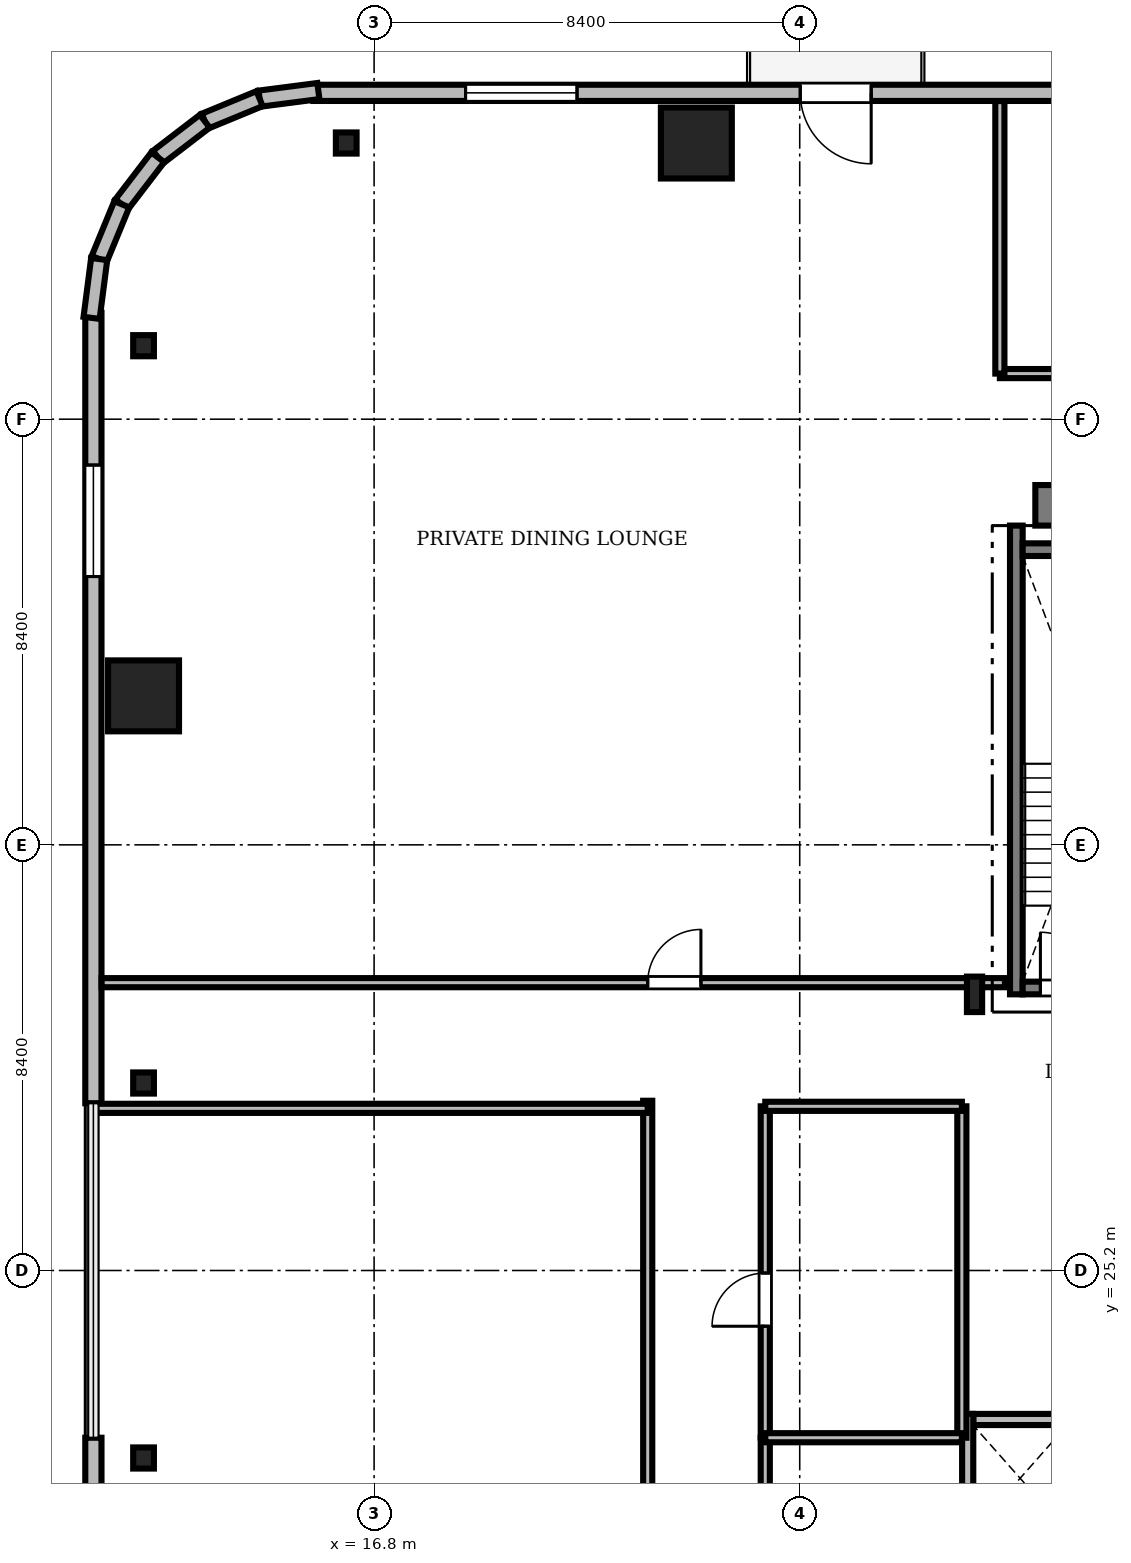
"""IFC4 building model, lengths in metres.
Left out: names, types, materials, properties, quantities, classifications, styles, units other than length and angle.
Written with IfcOpenShell. Run it as: python <this file> out.ifc"""

import sys

from ifc_helpers import new_model, si_unit, direction, frame, frame_2d, origin, origin_2d, place, context, subcontext, project, spatial, rectangle, i_section, extrude, source, transform, mapped, element, fill, save


model = new_model("IFC4")
c1 = context("Model", 3, precision=1e-05, world=origin(), true_north=direction((0.0, 1.0)))
c2 = subcontext(c1, "Body", "Model", "MODEL_VIEW")
j1 = project(units=[si_unit("LENGTHUNIT", "METRE"), si_unit("PLANEANGLEUNIT", "RADIAN")], contexts=[c1])
p1 = place(None, origin())
s1 = spatial("IfcSite", under=j1, at=p1, CompositionType="ELEMENT")
p2 = place(p1, origin())
s2 = spatial("IfcBuilding", under=s1, at=p2, CompositionType="ELEMENT")
p3 = place(p2, frame((0.0, 0.0, 192.3)))
s3 = spatial("IfcBuildingStorey", under=s2, at=p3, CompositionType="ELEMENT", Elevation=192.3)
m1 = source(origin(), c2, "Body", "SweptSolid", [
    extrude(rectangle(XDim=17.52, YDim=0.8, at=frame_2d((8.76, 0.0))), origin(), (0.0, 0.0, 1.0), 3.53),
])
p4 = place(p3, frame((29.85, 40.3, 0.0), z_axis=(0.0, 0.0, 1.0), x_axis=(1.0, 0.0, 0.0)))
e1 = element("IfcWall", 1, at=p4, inside=s3, PredefinedType="SHEAR", context=c2, shape_type="MappedRepresentation", body=[
    mapped(m1, transform((0.0, 0.0, 0.0), scale=1.0)),
])
m2 = source(origin(), c2, "Body", "SweptSolid", [
    extrude(i_section(OverallWidth=0.3, OverallDepth=0.7, WebThickness=0.017, FlangeThickness=0.032, FilletRadius=0.027, at=origin_2d()), origin(), (0.0, 0.0, 1.0), 3.53),
])
p5 = place(p3, frame((28.65, 30.65, 0.0), z_axis=(0.0, 0.0, 1.0), x_axis=(1.0, 0.0, 0.0)))
e2 = element("IfcColumn", 2, at=p5, inside=s3, PredefinedType="COLUMN", context=c2, shape_type="MappedRepresentation", body=[
    mapped(m2, transform((0.0, 0.0, 0.0), scale=1.0)),
])
m3 = source(origin(), c2, "Body", "SweptSolid", [
    extrude(rectangle(XDim=1.4, YDim=1.4, at=origin_2d()), origin(), (0.0, 0.0, 1.0), 3.53),
])
for number, where, z_axis, x_axis in (
    (3, (23.16, 47.45, 0.0), (0.0, 0.0, 1.0), (1.0, 0.0, 0.0)),
    (4, (12.25, 36.54, 0.0), (0.0, 0.0, 1.0), (1.0, 0.0, 0.0)),
):
    element("IfcColumn", number, at=place(p3, frame(where, z_axis=z_axis, x_axis=x_axis)), inside=s3, PredefinedType="COLUMN", context=c2, shape_type="MappedRepresentation", body=[
        mapped(m3, transform((0.0, 0.0, 0.0), scale=1.0)),
    ])
m4 = source(origin(), c2, "Body", "SweptSolid", [
    extrude(i_section(OverallWidth=0.409, OverallDepth=0.417, WebThickness=0.021, FlangeThickness=0.033, FilletRadius=0.015, at=origin_2d()), origin(), (0.0, 0.0, 1.0), 3.53),
])
for number, where, z_axis, x_axis in (
    (5, (16.25, 47.45, 0.0), (0.0, 0.0, 1.0), (1.0, 0.0, 0.0)),
    (6, (12.25, 43.45, 0.0), (0.0, 0.0, 1.0), (1.0, 0.0, 0.0)),
    (7, (12.25, 28.9, 0.0), (0.0, 0.0, 1.0), (1.0, 0.0, 0.0)),
    (8, (12.25, 21.5, 0.0), (0.0, 0.0, 1.0), (1.0, 0.0, 0.0)),
):
    element("IfcColumn", number, at=place(p3, frame(where, z_axis=z_axis, x_axis=x_axis)), inside=s3, PredefinedType="COLUMN", context=c2, shape_type="MappedRepresentation", body=[
        mapped(m4, transform((0.0, 0.0, 0.0), scale=1.0)),
    ])
m5 = source(origin(), c2, "Body", "SweptSolid", [
    extrude(rectangle(XDim=15.6, YDim=0.32, at=frame_2d((7.8, 0.0))), origin(), (0.0, 0.0, 1.0), 3.53),
])
p6 = place(p3, frame((31.2, 48.44, 0.0), z_axis=(0.0, 0.0, 1.0), x_axis=(-1.0, 0.0, 0.0)))
e9 = element("IfcWall", 9, at=p6, inside=s3, PredefinedType="SOLIDWALL", context=c2, shape_type="MappedRepresentation", body=[
    mapped(m5, transform((0.0, 0.0, 0.0), scale=1.0)),
])
m6 = source(origin(), c2, "Body", "SweptSolid", [
    extrude(rectangle(XDim=1.4, YDim=2.3, at=frame_2d((0.7, 1.15))), frame((0.0, 0.17, 0.0), z_axis=(0.0, -1.0, 0.0), x_axis=(1.0, 0.0, 0.0)), (0.0, 0.0, 1.0), 0.34),
])
p7 = place(p6, frame((4.59, 0.0, 0.0)))
e10 = element("IfcOpeningElement", 10, at=p7, cuts=e9, PredefinedType="OPENING", context=c2, shape_type="MappedRepresentation", body=[
    mapped(m6, transform((0.0, 0.0, 0.0), scale=1.0)),
])
m7 = source(origin(), c2, "Body", "SweptSolid", [
    extrude(rectangle(XDim=2.2, YDim=2.4, at=frame_2d((1.1, 1.2))), frame((0.0, 0.17, 0.0), z_axis=(0.0, -1.0, 0.0), x_axis=(1.0, 0.0, 0.0)), (0.0, 0.0, 1.0), 0.34),
])
p8 = place(p6, frame((10.395, 0.0, 0.72)))
e11 = element("IfcOpeningElement", 11, at=p8, cuts=e9, PredefinedType="OPENING", context=c2, shape_type="MappedRepresentation", body=[
    mapped(m7, transform((0.0, 0.0, 0.0), scale=1.0)),
])
m8 = source(origin(), c2, "Body", "SweptSolid", [
    extrude(rectangle(XDim=15.6, YDim=0.32, at=frame_2d((7.8, 0.0))), origin(), (0.0, 0.0, 1.0), 3.53),
])
p9 = place(p3, frame((11.26, 44.1, 0.0), z_axis=(0.0, 0.0, 1.0), x_axis=(0.0, -1.0, 0.0)))
e12 = element("IfcWall", 12, at=p9, inside=s3, PredefinedType="SOLIDWALL", context=c2, shape_type="MappedRepresentation", body=[
    mapped(m8, transform((0.0, 0.0, 0.0), scale=1.0)),
])
p10 = place(p9, frame((3.005, 0.0, 0.72)))
e13 = element("IfcOpeningElement", 13, at=p10, cuts=e12, PredefinedType="OPENING", context=c2, shape_type="MappedRepresentation", body=[
    mapped(m7, transform((0.0, 0.0, 0.0), scale=1.0)),
])
p11 = place(p3, frame((11.26, 21.9, 0.0), z_axis=(0.0, 0.0, 1.0), x_axis=(0.0, -1.0, 0.0)))
e14 = element("IfcWall", 14, at=p11, inside=s3, PredefinedType="SOLIDWALL", context=c2, shape_type="MappedRepresentation", body=[
    mapped(m5, transform((0.0, 0.0, 0.0), scale=1.0)),
])
p12 = place(p11, frame((4.59, 0.0, 0.0)))
e15 = element("IfcOpeningElement", 15, at=p12, cuts=e14, PredefinedType="OPENING", context=c2, shape_type="MappedRepresentation", body=[
    mapped(m6, transform((0.0, 0.0, 0.0), scale=1.0)),
])
p13 = place(p11, frame((10.395, 0.0, 0.72)))
e16 = element("IfcOpeningElement", 16, at=p13, cuts=e14, PredefinedType="OPENING", context=c2, shape_type="MappedRepresentation", body=[
    mapped(m7, transform((0.0, 0.0, 0.0), scale=1.0)),
])
m9 = source(origin(), c2, "Body", "SweptSolid", [
    extrude(rectangle(XDim=1.17, YDim=0.32, at=frame_2d((0.585, 0.0))), origin(), (0.0, 0.0, 1.0), 3.53),
])
p14 = place(p3, frame((15.7, 48.476, 0.0), z_axis=(0.0, 0.0, 1.0), x_axis=(-0.991735963317, -0.128295670475, 0.0)))
e17 = element("IfcWall", 17, at=p14, inside=s3, PredefinedType="SOLIDWALL", context=c2, shape_type="MappedRepresentation", body=[
    mapped(m9, transform((0.0, 0.0, 0.0), scale=1.0)),
])
m10 = source(origin(), c2, "Body", "SweptSolid", [
    extrude(rectangle(XDim=1.169, YDim=0.32, at=frame_2d((0.584, 0.0))), origin(), (0.0, 0.0, 1.0), 3.53),
])
p15 = place(p3, frame((14.54, 48.325, 0.0), z_axis=(0.0, 0.0, 1.0), x_axis=(-0.924552646638, -0.381054331552, 0.0)))
e18 = element("IfcWall", 18, at=p15, inside=s3, PredefinedType="SOLIDWALL", context=c2, shape_type="MappedRepresentation", body=[
    mapped(m10, transform((0.0, 0.0, 0.0), scale=1.0)),
])
m11 = source(origin(), c2, "Body", "SweptSolid", [
    extrude(rectangle(XDim=1.169, YDim=0.32, at=frame_2d((0.584, 0.0))), origin(), (0.0, 0.0, 1.0), 3.53),
])
p16 = place(p3, frame((13.459, 47.88, 0.0), z_axis=(0.0, 0.0, 1.0), x_axis=(-0.793663520347, -0.608356981114, 0.0)))
e19 = element("IfcWall", 19, at=p16, inside=s3, PredefinedType="SOLIDWALL", context=c2, shape_type="MappedRepresentation", body=[
    mapped(m11, transform((0.0, 0.0, 0.0), scale=1.0)),
])
m12 = source(origin(), c2, "Body", "SweptSolid", [
    extrude(rectangle(XDim=1.169, YDim=0.32, at=frame_2d((0.584, 0.0))), origin(), (0.0, 0.0, 1.0), 3.53),
])
p17 = place(p3, frame((12.531, 47.169, 0.0), z_axis=(0.0, 0.0, 1.0), x_axis=(-0.608387696831, -0.793639975269, 0.0)))
e20 = element("IfcWall", 20, at=p17, inside=s3, PredefinedType="SOLIDWALL", context=c2, shape_type="MappedRepresentation", body=[
    mapped(m12, transform((0.0, 0.0, 0.0), scale=1.0)),
])
p18 = place(p3, frame((11.82, 46.241, 0.0), z_axis=(0.0, 0.0, 1.0), x_axis=(-0.381054331552, -0.924552646638, 0.0)))
e21 = element("IfcWall", 21, at=p18, inside=s3, PredefinedType="SOLIDWALL", context=c2, shape_type="MappedRepresentation", body=[
    mapped(m10, transform((0.0, 0.0, 0.0), scale=1.0)),
])
p19 = place(p3, frame((11.375, 45.16, 0.0), z_axis=(0.0, 0.0, 1.0), x_axis=(-0.128295670475, -0.991735963317, 0.0)))
e22 = element("IfcWall", 22, at=p19, inside=s3, PredefinedType="SOLIDWALL", context=c2, shape_type="MappedRepresentation", body=[
    mapped(m9, transform((0.0, 0.0, 0.0), scale=1.0)),
])
m13 = source(origin(), c2, "Body", "SweptSolid", [
    extrude(rectangle(XDim=9.25, YDim=0.25, at=frame_2d((4.625, 0.0))), origin(), (0.0, 0.0, 1.0), 3.55),
])
p20 = place(p3, frame((29.475, 30.65, 0.0), z_axis=(0.0, 0.0, 1.0), x_axis=(0.0, 1.0, 0.0)))
e23 = element("IfcWall", 23, at=p20, inside=s3, PredefinedType="SOLIDWALL", context=c2, shape_type="MappedRepresentation", body=[
    mapped(m13, transform((0.0, 0.0, 0.0), scale=1.0)),
])
m14 = source(origin(), c2, "Body", "SweptSolid", [
    extrude(rectangle(XDim=3.15, YDim=0.25, at=frame_2d((1.575, 0.0))), origin(), (0.0, 0.0, 1.0), 3.55),
])
p21 = place(p3, frame((29.6, 39.425, 0.0), z_axis=(0.0, 0.0, 1.0), x_axis=(1.0, 0.0, 0.0)))
e24 = element("IfcWall", 24, at=p21, inside=s3, PredefinedType="SOLIDWALL", context=c2, shape_type="MappedRepresentation", body=[
    mapped(m14, transform((0.0, 0.0, 0.0), scale=1.0)),
])
p22 = place(p3, frame((29.6, 30.775, 0.0), z_axis=(0.0, 0.0, 1.0), x_axis=(1.0, 0.0, 0.0)))
e25 = element("IfcWall", 25, at=p22, inside=s3, PredefinedType="SOLIDWALL", context=c2, shape_type="MappedRepresentation", body=[
    mapped(m14, transform((0.0, 0.0, 0.0), scale=1.0)),
])
m15 = source(origin(), c2, "Body", "SweptSolid", [
    extrude(rectangle(XDim=1.1, YDim=2.2, at=frame_2d((0.55, 1.1))), frame((0.0, 0.135, 0.0), z_axis=(0.0, -1.0, 0.0), x_axis=(1.0, 0.0, 0.0)), (0.0, 0.0, 1.0), 0.27),
])
p23 = place(p22, frame((0.35, 0.0, 0.0)))
e26 = element("IfcOpeningElement", 26, at=p23, cuts=e25, PredefinedType="OPENING", context=c2, shape_type="MappedRepresentation", body=[
    mapped(m15, transform((0.0, 0.0, 0.0), scale=1.0)),
])
m16 = source(origin(), c2, "Body", "SweptSolid", [
    extrude(rectangle(XDim=1.85, YDim=0.22, at=frame_2d((0.925, 0.0))), origin(), (0.0, 0.0, 1.0), 3.53),
])
p24 = place(p3, frame((28.625, 22.26, 0.0), z_axis=(0.0, 0.0, 1.0), x_axis=(1.0, 0.0, 0.0)))
e27 = element("IfcWall", 27, at=p24, inside=s3, PredefinedType="SOLIDWALL", context=c2, shape_type="MappedRepresentation", body=[
    mapped(m16, transform((0.0, 0.0, 0.0), scale=1.0)),
])
m17 = source(origin(), c2, "Body", "SweptSolid", [
    extrude(rectangle(XDim=2.54, YDim=0.22, at=frame_2d((1.27, 0.0))), origin(), (0.0, 0.0, 1.0), 3.53),
])
p25 = place(p3, frame((28.515, 19.83, 0.0), z_axis=(0.0, 0.0, 1.0), x_axis=(0.0, 1.0, 0.0)))
e28 = element("IfcWall", 28, at=p25, inside=s3, PredefinedType="SOLIDWALL", context=c2, shape_type="MappedRepresentation", body=[
    mapped(m17, transform((0.0, 0.0, 0.0), scale=1.0)),
])
m18 = source(origin(), c2, "Body", "SweptSolid", [
    extrude(rectangle(XDim=28.428, YDim=0.18, at=frame_2d((14.214, 0.0))), origin(), (0.0, 0.0, 1.0), 2.772),
])
p26 = place(p3, frame((29.15, 42.9, 0.0), z_axis=(0.0, 0.0, 1.0), x_axis=(1.0, 0.0, 0.0)))
e29 = element("IfcWall", 29, at=p26, inside=s3, PredefinedType="PARTITIONING", context=c2, shape_type="MappedRepresentation", body=[
    mapped(m18, transform((0.0, 0.0, 0.0), scale=1.0)),
])
m19 = source(origin(), c2, "Body", "SweptSolid", [
    extrude(rectangle(XDim=1.05, YDim=2.2, at=frame_2d((0.525, 1.1))), frame((0.0, 0.1, 0.0), z_axis=(0.0, -1.0, 0.0), x_axis=(1.0, 0.0, 0.0)), (0.0, 0.0, 1.0), 0.2),
])
p27 = place(p26, frame((4.5, 0.0, 0.0)))
e30 = element("IfcOpeningElement", 30, at=p27, cuts=e29, PredefinedType="OPENING", context=c2, shape_type="MappedRepresentation", body=[
    mapped(m19, transform((0.0, 0.0, 0.0), scale=1.0)),
])
m20 = source(origin(), c2, "Body", "SweptSolid", [
    extrude(rectangle(XDim=17.828, YDim=0.18, at=frame_2d((8.914, 0.0))), origin(), (0.0, 0.0, 1.0), 2.772),
])
p28 = place(p3, frame((11.422, 30.88, 0.0), z_axis=(0.0, 0.0, 1.0), x_axis=(1.0, 0.0, 0.0)))
e31 = element("IfcWall", 31, at=p28, inside=s3, PredefinedType="PARTITIONING", context=c2, shape_type="MappedRepresentation", body=[
    mapped(m20, transform((0.0, 0.0, 0.0), scale=1.0)),
])
p29 = place(p28, frame((10.778, 0.0, 0.0)))
e32 = element("IfcOpeningElement", 32, at=p29, cuts=e31, PredefinedType="OPENING", context=c2, shape_type="MappedRepresentation", body=[
    mapped(m19, transform((0.0, 0.0, 0.0), scale=1.0)),
])
m21 = source(origin(), c2, "Body", "SweptSolid", [
    extrude(rectangle(XDim=14.98, YDim=0.18, at=frame_2d((7.49, 0.0))), origin(), (0.0, 0.0, 1.0), 2.972),
])
p30 = place(p3, frame((22.2, 13.57, 0.0), z_axis=(0.0, 0.0, 1.0), x_axis=(0.0, 1.0, 0.0)))
e33 = element("IfcWall", 33, at=p30, inside=s3, PredefinedType="PARTITIONING", context=c2, shape_type="MappedRepresentation", body=[
    mapped(m21, transform((0.0, 0.0, 0.0), scale=1.0)),
])
p31 = place(p30, frame((1.6, 0.0, 0.0)))
e34 = element("IfcOpeningElement", 34, at=p31, cuts=e33, PredefinedType="OPENING", context=c2, shape_type="MappedRepresentation", body=[
    mapped(m19, transform((0.0, 0.0, 0.0), scale=1.0)),
])
m22 = source(origin(), c2, "Body", "SweptSolid", [
    extrude(rectangle(XDim=6.54, YDim=0.18, at=frame_2d((3.27, 0.0))), origin(), (0.0, 0.0, 1.0), 2.972),
])
p32 = place(p3, frame((24.52, 21.9, 0.0), z_axis=(0.0, 0.0, 1.0), x_axis=(0.0, 1.0, 0.0)))
e35 = element("IfcWall", 35, at=p32, inside=s3, PredefinedType="PARTITIONING", context=c2, shape_type="MappedRepresentation", body=[
    mapped(m22, transform((0.0, 0.0, 0.0), scale=1.0)),
])
p33 = place(p32, frame((2.2, 0.0, 0.0)))
e36 = element("IfcOpeningElement", 36, at=p33, cuts=e35, PredefinedType="OPENING", context=c2, shape_type="MappedRepresentation", body=[
    mapped(m19, transform((0.0, 0.0, 0.0), scale=1.0)),
])
m23 = source(origin(), c2, "Body", "SweptSolid", [
    extrude(rectangle(XDim=5.4, YDim=0.18, at=frame_2d((2.7, 0.0))), origin(), (0.0, 0.0, 1.0), 2.972),
])
p34 = place(p3, frame((24.52, 16.5, 0.0), z_axis=(0.0, 0.0, 1.0), x_axis=(0.0, 1.0, 0.0)))
e37 = element("IfcWall", 37, at=p34, inside=s3, PredefinedType="PARTITIONING", context=c2, shape_type="MappedRepresentation", body=[
    mapped(m23, transform((0.0, 0.0, 0.0), scale=1.0)),
])
p35 = place(p34, frame((2.0, 0.0, 0.0)))
e38 = element("IfcOpeningElement", 38, at=p35, cuts=e37, PredefinedType="OPENING", context=c2, shape_type="MappedRepresentation", body=[
    mapped(m19, transform((0.0, 0.0, 0.0), scale=1.0)),
])
m24 = source(origin(), c2, "Body", "SweptSolid", [
    extrude(rectangle(XDim=10.97, YDim=0.18, at=frame_2d((5.485, 0.0))), origin(), (0.0, 0.0, 1.0), 2.772),
])
p36 = place(p3, frame((11.23, 28.4, 0.0), z_axis=(0.0, 0.0, 1.0), x_axis=(1.0, 0.0, 0.0)))
e39 = element("IfcWall", 39, at=p36, inside=s3, PredefinedType="PARTITIONING", context=c2, shape_type="MappedRepresentation", body=[
    mapped(m24, transform((0.0, 0.0, 0.0), scale=1.0)),
])
p37 = place(p3, frame((28.4, 21.9, 0.0), z_axis=(0.0, 0.0, 1.0), x_axis=(0.0, 1.0, 0.0)))
e40 = element("IfcWall", 40, at=p37, inside=s3, PredefinedType="PARTITIONING", context=c2, shape_type="MappedRepresentation", body=[
    mapped(m22, transform((0.0, 0.0, 0.0), scale=1.0)),
])
m25 = source(origin(), c2, "Body", "SweptSolid", [
    extrude(rectangle(XDim=5.378, YDim=0.18, at=frame_2d((2.689, 0.0))), origin(), (0.0, 0.0, 1.0), 2.772),
])
p38 = place(p3, frame((29.15, 42.9, 0.0), z_axis=(0.0, 0.0, 1.0), x_axis=(0.0, 1.0, 0.0)))
e41 = element("IfcWall", 41, at=p38, inside=s3, PredefinedType="PARTITIONING", context=c2, shape_type="MappedRepresentation", body=[
    mapped(m25, transform((0.0, 0.0, 0.0), scale=1.0)),
])
m26 = source(origin(), c2, "Body", "SweptSolid", [
    extrude(rectangle(XDim=3.88, YDim=0.18, at=frame_2d((1.94, 0.0))), origin(), (0.0, 0.0, 1.0), 3.53),
])
for number, where, z_axis, x_axis in (
    (42, (24.52, 21.9, 0.0), (0.0, 0.0, 1.0), (1.0, 0.0, 0.0)),
    (43, (24.52, 28.44, 0.0), (0.0, 0.0, 1.0), (1.0, 0.0, 0.0)),
):
    element("IfcWall", number, at=place(p3, frame(where, z_axis=z_axis, x_axis=x_axis)), inside=s3, PredefinedType="PARTITIONING", context=c2, shape_type="MappedRepresentation", body=[
        mapped(m26, transform((0.0, 0.0, 0.0), scale=1.0)),
    ])
m27 = source(origin(), c2, "Body", "SweptSolid", [
    extrude(rectangle(XDim=1.4, YDim=2.3, at=frame_2d((0.7, 1.15))), frame((0.0, 0.025, 0.0), z_axis=(0.0, -1.0, 0.0), x_axis=(1.0, 0.0, 0.0)), (0.0, 0.0, 1.0), 0.05),
])
p39 = place(p7, frame((1.4, 0.0, 0.0), z_axis=(0.0, 0.0, 1.0), x_axis=(-1.0, 0.0, 0.0)))
e44 = element("IfcDoor", 44, at=p39, inside=s3, OperationType="DOUBLE_DOOR_SLIDING", PredefinedType="DOOR", context=c2, shape_type="MappedRepresentation", body=[
    mapped(m27, transform((0.0, 0.0, 0.0), scale=1.0)),
])
fill(e10, e44)
m28 = source(origin(), c2, "Body", "SweptSolid", [
    extrude(rectangle(XDim=2.2, YDim=2.4, at=frame_2d((1.1, 1.2))), frame((0.0, 0.03, 0.0), z_axis=(0.0, -1.0, 0.0), x_axis=(1.0, 0.0, 0.0)), (0.0, 0.0, 1.0), 0.06),
])
p40 = place(p8, origin())
e45 = element("IfcWindow", 45, at=p40, inside=s3, PartitioningType="SINGLE_PANEL", PredefinedType="WINDOW", context=c2, shape_type="MappedRepresentation", body=[
    mapped(m28, transform((0.0, 0.0, 0.0), scale=1.0)),
])
fill(e11, e45)
p41 = place(p10, origin())
e46 = element("IfcWindow", 46, at=p41, inside=s3, PartitioningType="SINGLE_PANEL", PredefinedType="WINDOW", context=c2, shape_type="MappedRepresentation", body=[
    mapped(m28, transform((0.0, 0.0, 0.0), scale=1.0)),
])
fill(e13, e46)
m29 = source(origin(), c2, "Body", "SweptSolid", [
    extrude(rectangle(XDim=1.1, YDim=2.2, at=frame_2d((0.55, 1.1))), frame((0.0, 0.025, 0.0), z_axis=(0.0, -1.0, 0.0), x_axis=(1.0, 0.0, 0.0)), (0.0, 0.0, 1.0), 0.05),
])
p42 = place(p23, origin())
e47 = element("IfcDoor", 47, at=p42, inside=s3, OperationType="SINGLE_SWING_LEFT", PredefinedType="DOOR", context=c2, shape_type="MappedRepresentation", body=[
    mapped(m29, transform((0.0, 0.0, 0.0), scale=1.0)),
])
fill(e26, e47)
m30 = source(origin(), c2, "Body", "SweptSolid", [
    extrude(rectangle(XDim=1.05, YDim=2.2, at=frame_2d((0.525, 1.1))), frame((0.0, 0.025, 0.0), z_axis=(0.0, -1.0, 0.0), x_axis=(1.0, 0.0, 0.0)), (0.0, 0.0, 1.0), 0.05),
])
p43 = place(p29, origin())
e48 = element("IfcDoor", 48, at=p43, inside=s3, OperationType="SINGLE_SWING_RIGHT", PredefinedType="DOOR", context=c2, shape_type="MappedRepresentation", body=[
    mapped(m30, transform((0.0, 0.0, 0.0), scale=1.0)),
])
fill(e32, e48)
p44 = place(p33, origin())
e49 = element("IfcDoor", 49, at=p44, inside=s3, OperationType="SINGLE_SWING_LEFT", PredefinedType="DOOR", context=c2, shape_type="MappedRepresentation", body=[
    mapped(m30, transform((0.0, 0.0, 0.0), scale=1.0)),
])
fill(e36, e49)
save(model, sys.argv[1])
